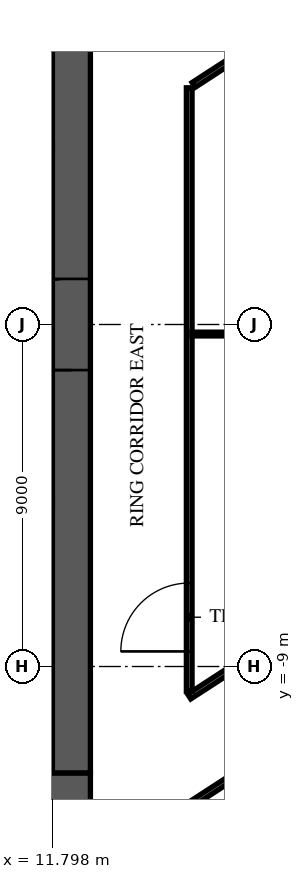
"""IFC4 building model, lengths in metres.
Left out: names, types, materials, properties, quantities, classifications, styles, units other than length and angle.
Written with IfcOpenShell. Run it as: python <this file> out.ifc"""

import sys

from ifc_helpers import new_model, si_unit, direction, frame, frame_2d, origin, place, context, subcontext, project, spatial, rectangle, extrude, element, fill, save


model = new_model("IFC4")
c1 = context("Model", 3, precision=1e-05, world=origin(), true_north=direction((0.0, 1.0)))
c2 = subcontext(c1, "Body", "Model", "MODEL_VIEW")
j1 = project(units=[si_unit("LENGTHUNIT", "METRE"), si_unit("PLANEANGLEUNIT", "RADIAN")], contexts=[c1])
p1 = place(None, origin())
s1 = spatial("IfcSite", under=j1, at=p1, CompositionType="ELEMENT")
p2 = place(p1, origin())
s2 = spatial("IfcBuilding", under=s1, at=p2, CompositionType="ELEMENT")
p3 = place(p2, frame((0.0, 0.0, 155.7)))
s3 = spatial("IfcBuildingStorey", under=s2, at=p3, CompositionType="ELEMENT", Elevation=155.7)
p4 = place(p3, frame((-12.8, -12.3, 0.0), z_axis=(0.0, 0.0, 1.0), x_axis=(1.0, 0.0, 0.0)))
e1 = element("IfcWall", 1, at=p4, inside=s3, PredefinedType="SHEAR", context=c2, shape_type="SweptSolid", body=[
    extrude(rectangle(XDim=25.6, YDim=1.0, at=frame_2d((12.8, 0.0))), origin(), (0.0, 0.0, 1.0), 3.6),
])
p5 = place(p4, frame((7.7, 0.0, 0.0)))
e2 = element("IfcOpeningElement", 2, at=p5, cuts=e1, PredefinedType="OPENING", context=c2, shape_type="SweptSolid", body=[
    extrude(rectangle(XDim=2.0, YDim=2.1, at=frame_2d((1.0, 1.05))), frame((0.0, 0.51, 0.0), z_axis=(0.0, -1.0, 0.0), x_axis=(1.0, 0.0, 0.0)), (0.0, 0.0, 1.0), 1.02),
])
p6 = place(p4, frame((17.825, 0.0, 0.0)))
e3 = element("IfcOpeningElement", 3, at=p6, cuts=e1, PredefinedType="OPENING", context=c2, shape_type="SweptSolid", body=[
    extrude(rectangle(XDim=1.2, YDim=2.1, at=frame_2d((0.6, 1.05))), frame((0.0, 0.51, 0.0), z_axis=(0.0, -1.0, 0.0), x_axis=(1.0, 0.0, 0.0)), (0.0, 0.0, 1.0), 1.02),
])
p7 = place(p4, frame((1.975, 0.0, 0.0)))
e4 = element("IfcOpeningElement", 4, at=p7, cuts=e1, PredefinedType="OPENING", context=c2, shape_type="SweptSolid", body=[
    extrude(rectangle(XDim=1.2, YDim=2.1, at=frame_2d((0.6, 1.05))), frame((0.0, 0.51, 0.0), z_axis=(0.0, -1.0, 0.0), x_axis=(1.0, 0.0, 0.0)), (0.0, 0.0, 1.0), 1.02),
])
p8 = place(p4, frame((22.425, 0.0, 0.0)))
e5 = element("IfcOpeningElement", 5, at=p8, cuts=e1, PredefinedType="OPENING", context=c2, shape_type="SweptSolid", body=[
    extrude(rectangle(XDim=1.2, YDim=2.1, at=frame_2d((0.6, 1.05))), frame((0.0, 0.51, 0.0), z_axis=(0.0, -1.0, 0.0), x_axis=(1.0, 0.0, 0.0)), (0.0, 0.0, 1.0), 1.02),
])
p9 = place(p3, frame((12.3, -11.8, 0.0), z_axis=(0.0, 0.0, 1.0), x_axis=(0.0, 1.0, 0.0)))
e6 = element("IfcWall", 6, at=p9, inside=s3, PredefinedType="SHEAR", context=c2, shape_type="SweptSolid", body=[
    extrude(rectangle(XDim=23.6, YDim=1.0, at=frame_2d((11.8, 0.0))), origin(), (0.0, 0.0, 1.0), 3.6),
])
p10 = place(p9, frame((10.6, 0.0, 0.0)))
e7 = element("IfcOpeningElement", 7, at=p10, cuts=e6, PredefinedType="OPENING", context=c2, shape_type="SweptSolid", body=[
    extrude(rectangle(XDim=2.4, YDim=2.4, at=frame_2d((1.2, 1.2))), frame((0.0, 0.51, 0.0), z_axis=(0.0, -1.0, 0.0), x_axis=(1.0, 0.0, 0.0)), (0.0, 0.0, 1.0), 1.02),
])
for number, where, z_axis, x_axis in (
    (8, (8.65, 4.675, 0.0), (0.0, 0.0, 1.0), (1.0, 0.0, 0.0)),
    (9, (8.65, -4.675, 0.0), (0.0, 0.0, 1.0), (1.0, 0.0, 0.0)),
):
    element("IfcWall", number, at=place(p3, frame(where, z_axis=z_axis, x_axis=x_axis)), inside=s3, PredefinedType="SOLIDWALL", context=c2, shape_type="SweptSolid", body=[
        extrude(rectangle(XDim=3.15, YDim=0.25, at=frame_2d((1.575, 0.0))), origin(), (0.0, 0.0, 1.0), 3.6),
    ])
p11 = place(p3, frame((-6.647, -35.438, 0.0), z_axis=(0.0, 0.0, 1.0), x_axis=(0.838672034147, 0.544636777257, 0.0)))
e10 = element("IfcWall", 10, at=p11, inside=s3, PredefinedType="STANDARD", context=c2, shape_type="SweptSolid", body=[
    extrude(rectangle(XDim=49.751, YDim=0.6, at=frame_2d((24.876, 0.0))), origin(), (0.0, 0.0, 1.0), 3.6),
])
p12 = place(p11, frame((1.161, 0.0, 0.9)))
e11 = element("IfcOpeningElement", 11, at=p12, cuts=e10, PredefinedType="OPENING", context=c2, shape_type="SweptSolid", body=[
    extrude(rectangle(XDim=2.1, YDim=2.1, at=frame_2d((1.05, 1.05))), frame((0.0, 0.31, 0.0), z_axis=(0.0, -1.0, 0.0), x_axis=(1.0, 0.0, 0.0)), (0.0, 0.0, 1.0), 0.62),
])
p13 = place(p11, frame((5.644, 0.0, 0.9)))
e12 = element("IfcOpeningElement", 12, at=p13, cuts=e10, PredefinedType="OPENING", context=c2, shape_type="SweptSolid", body=[
    extrude(rectangle(XDim=2.1, YDim=2.1, at=frame_2d((1.05, 1.05))), frame((0.0, 0.31, 0.0), z_axis=(0.0, -1.0, 0.0), x_axis=(1.0, 0.0, 0.0)), (0.0, 0.0, 1.0), 0.62),
])
p14 = place(p11, frame((10.189, 0.0, 0.9)))
e13 = element("IfcOpeningElement", 13, at=p14, cuts=e10, PredefinedType="OPENING", context=c2, shape_type="SweptSolid", body=[
    extrude(rectangle(XDim=2.1, YDim=2.1, at=frame_2d((1.05, 1.05))), frame((0.0, 0.31, 0.0), z_axis=(0.0, -1.0, 0.0), x_axis=(1.0, 0.0, 0.0)), (0.0, 0.0, 1.0), 0.62),
])
p15 = place(p11, frame((14.735, 0.0, 0.9)))
e14 = element("IfcOpeningElement", 14, at=p15, cuts=e10, PredefinedType="OPENING", context=c2, shape_type="SweptSolid", body=[
    extrude(rectangle(XDim=2.1, YDim=2.1, at=frame_2d((1.05, 1.05))), frame((0.0, 0.31, 0.0), z_axis=(0.0, -1.0, 0.0), x_axis=(1.0, 0.0, 0.0)), (0.0, 0.0, 1.0), 0.62),
])
p16 = place(p11, frame((19.28, 0.0, 0.9)))
e15 = element("IfcOpeningElement", 15, at=p16, cuts=e10, PredefinedType="OPENING", context=c2, shape_type="SweptSolid", body=[
    extrude(rectangle(XDim=2.1, YDim=2.1, at=frame_2d((1.05, 1.05))), frame((0.0, 0.31, 0.0), z_axis=(0.0, -1.0, 0.0), x_axis=(1.0, 0.0, 0.0)), (0.0, 0.0, 1.0), 0.62),
])
p17 = place(p11, frame((23.826, 0.0, 0.9)))
e16 = element("IfcOpeningElement", 16, at=p17, cuts=e10, PredefinedType="OPENING", context=c2, shape_type="SweptSolid", body=[
    extrude(rectangle(XDim=2.1, YDim=2.1, at=frame_2d((1.05, 1.05))), frame((0.0, 0.31, 0.0), z_axis=(0.0, -1.0, 0.0), x_axis=(1.0, 0.0, 0.0)), (0.0, 0.0, 1.0), 0.62),
])
p18 = place(p11, frame((28.371, 0.0, 0.9)))
e17 = element("IfcOpeningElement", 17, at=p18, cuts=e10, PredefinedType="OPENING", context=c2, shape_type="SweptSolid", body=[
    extrude(rectangle(XDim=2.1, YDim=2.1, at=frame_2d((1.05, 1.05))), frame((0.0, 0.31, 0.0), z_axis=(0.0, -1.0, 0.0), x_axis=(1.0, 0.0, 0.0)), (0.0, 0.0, 1.0), 0.62),
])
p19 = place(p11, frame((32.917, 0.0, 0.9)))
e18 = element("IfcOpeningElement", 18, at=p19, cuts=e10, PredefinedType="OPENING", context=c2, shape_type="SweptSolid", body=[
    extrude(rectangle(XDim=2.1, YDim=2.1, at=frame_2d((1.05, 1.05))), frame((0.0, 0.31, 0.0), z_axis=(0.0, -1.0, 0.0), x_axis=(1.0, 0.0, 0.0)), (0.0, 0.0, 1.0), 0.62),
])
p20 = place(p11, frame((37.462, 0.0, 0.9)))
e19 = element("IfcOpeningElement", 19, at=p20, cuts=e10, PredefinedType="OPENING", context=c2, shape_type="SweptSolid", body=[
    extrude(rectangle(XDim=2.1, YDim=2.1, at=frame_2d((1.05, 1.05))), frame((0.0, 0.31, 0.0), z_axis=(0.0, -1.0, 0.0), x_axis=(1.0, 0.0, 0.0)), (0.0, 0.0, 1.0), 0.62),
])
p21 = place(p11, frame((42.008, 0.0, 0.9)))
e20 = element("IfcOpeningElement", 20, at=p21, cuts=e10, PredefinedType="OPENING", context=c2, shape_type="SweptSolid", body=[
    extrude(rectangle(XDim=2.1, YDim=2.1, at=frame_2d((1.05, 1.05))), frame((0.0, 0.31, 0.0), z_axis=(0.0, -1.0, 0.0), x_axis=(1.0, 0.0, 0.0)), (0.0, 0.0, 1.0), 0.62),
])
p22 = place(p11, frame((46.491, 0.0, 0.9)))
e21 = element("IfcOpeningElement", 21, at=p22, cuts=e10, PredefinedType="OPENING", context=c2, shape_type="SweptSolid", body=[
    extrude(rectangle(XDim=2.1, YDim=2.1, at=frame_2d((1.05, 1.05))), frame((0.0, 0.31, 0.0), z_axis=(0.0, -1.0, 0.0), x_axis=(1.0, 0.0, 0.0)), (0.0, 0.0, 1.0), 0.62),
])
p23 = place(p3, frame((36.496, -1.667, 0.0), z_axis=(0.0, 0.0, 1.0), x_axis=(-0.544637117646, 0.838671813096, 0.0)))
e22 = element("IfcWall", 22, at=p23, inside=s3, PredefinedType="STANDARD", context=c2, shape_type="SweptSolid", body=[
    extrude(rectangle(XDim=42.176, YDim=0.6, at=frame_2d((21.088, 0.0))), origin(), (0.0, 0.0, 1.0), 3.6),
])
p24 = place(p23, frame((1.138, 0.0, 0.9)))
e23 = element("IfcOpeningElement", 23, at=p24, cuts=e22, PredefinedType="OPENING", context=c2, shape_type="SweptSolid", body=[
    extrude(rectangle(XDim=2.3, YDim=2.1, at=frame_2d((1.15, 1.05))), frame((0.0, 0.31, 0.0), z_axis=(0.0, -1.0, 0.0), x_axis=(1.0, 0.0, 0.0)), (0.0, 0.0, 1.0), 0.62),
])
p25 = place(p23, frame((5.776, 0.0, 0.9)))
e24 = element("IfcOpeningElement", 24, at=p25, cuts=e22, PredefinedType="OPENING", context=c2, shape_type="SweptSolid", body=[
    extrude(rectangle(XDim=2.3, YDim=2.1, at=frame_2d((1.15, 1.05))), frame((0.0, 0.31, 0.0), z_axis=(0.0, -1.0, 0.0), x_axis=(1.0, 0.0, 0.0)), (0.0, 0.0, 1.0), 0.62),
])
p26 = place(p23, frame((10.476, 0.0, 0.9)))
e25 = element("IfcOpeningElement", 25, at=p26, cuts=e22, PredefinedType="OPENING", context=c2, shape_type="SweptSolid", body=[
    extrude(rectangle(XDim=2.3, YDim=2.1, at=frame_2d((1.15, 1.05))), frame((0.0, 0.31, 0.0), z_axis=(0.0, -1.0, 0.0), x_axis=(1.0, 0.0, 0.0)), (0.0, 0.0, 1.0), 0.62),
])
p27 = place(p23, frame((15.176, 0.0, 0.9)))
e26 = element("IfcOpeningElement", 26, at=p27, cuts=e22, PredefinedType="OPENING", context=c2, shape_type="SweptSolid", body=[
    extrude(rectangle(XDim=2.3, YDim=2.1, at=frame_2d((1.15, 1.05))), frame((0.0, 0.31, 0.0), z_axis=(0.0, -1.0, 0.0), x_axis=(1.0, 0.0, 0.0)), (0.0, 0.0, 1.0), 0.62),
])
p28 = place(p23, frame((19.876, 0.0, 0.9)))
e27 = element("IfcOpeningElement", 27, at=p28, cuts=e22, PredefinedType="OPENING", context=c2, shape_type="SweptSolid", body=[
    extrude(rectangle(XDim=2.3, YDim=2.1, at=frame_2d((1.15, 1.05))), frame((0.0, 0.31, 0.0), z_axis=(0.0, -1.0, 0.0), x_axis=(1.0, 0.0, 0.0)), (0.0, 0.0, 1.0), 0.62),
])
p29 = place(p23, frame((24.576, 0.0, 0.9)))
e28 = element("IfcOpeningElement", 28, at=p29, cuts=e22, PredefinedType="OPENING", context=c2, shape_type="SweptSolid", body=[
    extrude(rectangle(XDim=2.3, YDim=2.1, at=frame_2d((1.15, 1.05))), frame((0.0, 0.31, 0.0), z_axis=(0.0, -1.0, 0.0), x_axis=(1.0, 0.0, 0.0)), (0.0, 0.0, 1.0), 0.62),
])
p30 = place(p23, frame((29.276, 0.0, 0.9)))
e29 = element("IfcOpeningElement", 29, at=p30, cuts=e22, PredefinedType="OPENING", context=c2, shape_type="SweptSolid", body=[
    extrude(rectangle(XDim=2.3, YDim=2.1, at=frame_2d((1.15, 1.05))), frame((0.0, 0.31, 0.0), z_axis=(0.0, -1.0, 0.0), x_axis=(1.0, 0.0, 0.0)), (0.0, 0.0, 1.0), 0.62),
])
p31 = place(p23, frame((33.976, 0.0, 0.9)))
e30 = element("IfcOpeningElement", 30, at=p31, cuts=e22, PredefinedType="OPENING", context=c2, shape_type="SweptSolid", body=[
    extrude(rectangle(XDim=2.3, YDim=2.1, at=frame_2d((1.15, 1.05))), frame((0.0, 0.31, 0.0), z_axis=(0.0, -1.0, 0.0), x_axis=(1.0, 0.0, 0.0)), (0.0, 0.0, 1.0), 0.62),
])
p32 = place(p23, frame((38.676, 0.0, 0.9)))
e31 = element("IfcOpeningElement", 31, at=p32, cuts=e22, PredefinedType="OPENING", context=c2, shape_type="SweptSolid", body=[
    extrude(rectangle(XDim=2.3, YDim=2.1, at=frame_2d((1.15, 1.05))), frame((0.0, 0.31, 0.0), z_axis=(0.0, -1.0, 0.0), x_axis=(1.0, 0.0, 0.0)), (0.0, 0.0, 1.0), 0.62),
])
p33 = place(p3, frame((-4.376, -25.496, 0.0), z_axis=(0.0, 0.0, 1.0), x_axis=(0.838659454634, 0.544656147631, 0.0)))
e32 = element("IfcWall", 32, at=p33, inside=s3, PredefinedType="PARTITIONING", context=c2, shape_type="SweptSolid", body=[
    extrude(rectangle(XDim=35.188, YDim=0.15, at=frame_2d((17.594, 0.0))), origin(), (0.0, 0.0, 1.0), 3.15),
])
p34 = place(p33, frame((2.55, 0.0, 0.0)))
e33 = element("IfcOpeningElement", 33, at=p34, cuts=e32, PredefinedType="OPENING", context=c2, shape_type="SweptSolid", body=[
    extrude(rectangle(XDim=1.0, YDim=2.1, at=frame_2d((0.5, 1.05))), frame((0.0, 0.085, 0.0), z_axis=(0.0, -1.0, 0.0), x_axis=(1.0, 0.0, 0.0)), (0.0, 0.0, 1.0), 0.17),
])
p35 = place(p33, frame((12.126, 0.0, 0.0)))
e34 = element("IfcOpeningElement", 34, at=p35, cuts=e32, PredefinedType="OPENING", context=c2, shape_type="SweptSolid", body=[
    extrude(rectangle(XDim=1.0, YDim=2.1, at=frame_2d((0.5, 1.05))), frame((0.0, 0.085, 0.0), z_axis=(0.0, -1.0, 0.0), x_axis=(1.0, 0.0, 0.0)), (0.0, 0.0, 1.0), 0.17),
])
p36 = place(p33, frame((25.759, 0.0, 0.0)))
e35 = element("IfcOpeningElement", 35, at=p36, cuts=e32, PredefinedType="OPENING", context=c2, shape_type="SweptSolid", body=[
    extrude(rectangle(XDim=1.0, YDim=2.1, at=frame_2d((0.5, 1.05))), frame((0.0, 0.085, 0.0), z_axis=(0.0, -1.0, 0.0), x_axis=(1.0, 0.0, 0.0)), (0.0, 0.0, 1.0), 0.17),
])
p37 = place(p3, frame((10.958, 22.783, 0.0), z_axis=(0.0, 0.0, 1.0), x_axis=(0.544655201926, -0.838660068809, 0.0)))
e36 = element("IfcWall", 36, at=p37, inside=s3, PredefinedType="PARTITIONING", context=c2, shape_type="SweptSolid", body=[
    extrude(rectangle(XDim=26.354, YDim=0.15, at=frame_2d((13.177, 0.0))), origin(), (0.0, 0.0, 1.0), 3.15),
])
p38 = place(p37, frame((13.46, 0.0, 0.0)))
e37 = element("IfcOpeningElement", 37, at=p38, cuts=e36, PredefinedType="OPENING", context=c2, shape_type="SweptSolid", body=[
    extrude(rectangle(XDim=1.0, YDim=2.1, at=frame_2d((0.5, 1.05))), frame((0.0, 0.085, 0.0), z_axis=(0.0, -1.0, 0.0), x_axis=(1.0, 0.0, 0.0)), (0.0, 0.0, 1.0), 0.17),
])
p39 = place(p3, frame((15.4, -9.791, 0.0), z_axis=(0.0, 0.0, 1.0), x_axis=(0.838699444503, 0.544594566435, 0.0)))
e38 = element("IfcWall", 38, at=p39, inside=s3, PredefinedType="PARTITIONING", context=c2, shape_type="SweptSolid", body=[
    extrude(rectangle(XDim=10.048, YDim=0.15, at=frame_2d((5.024, 0.0))), origin(), (0.0, 0.0, 1.0), 3.15),
])
p40 = place(p39, frame((5.8, 0.0, 0.0)))
e39 = element("IfcOpeningElement", 39, at=p40, cuts=e38, PredefinedType="OPENING", context=c2, shape_type="SweptSolid", body=[
    extrude(rectangle(XDim=1.0, YDim=2.1, at=frame_2d((0.5, 1.05))), frame((0.0, 0.085, 0.0), z_axis=(0.0, -1.0, 0.0), x_axis=(1.0, 0.0, 0.0)), (0.0, 0.0, 1.0), 0.17),
])
p41 = place(p3, frame((15.4, -9.653, 0.0), z_axis=(0.0, 0.0, 1.0), x_axis=(0.0, 1.0, 0.0)))
e40 = element("IfcWall", 40, at=p41, inside=s3, PredefinedType="PARTITIONING", context=c2, shape_type="SweptSolid", body=[
    extrude(rectangle(XDim=15.882, YDim=0.15, at=frame_2d((7.941, 0.0))), origin(), (0.0, 0.0, 1.0), 3.15),
])
p42 = place(p41, frame((1.05, 0.0, 0.0)))
e41 = element("IfcOpeningElement", 41, at=p42, cuts=e40, PredefinedType="OPENING", context=c2, shape_type="SweptSolid", body=[
    extrude(rectangle(XDim=1.8, YDim=2.1, at=frame_2d((0.9, 1.05))), frame((0.0, 0.085, 0.0), z_axis=(0.0, -1.0, 0.0), x_axis=(1.0, 0.0, 0.0)), (0.0, 0.0, 1.0), 0.17),
])
p43 = place(p3, frame((15.516, 6.304, 0.0), z_axis=(0.0, 0.0, 1.0), x_axis=(0.838528716493, 0.544857404846, 0.0)))
e42 = element("IfcWall", 42, at=p43, inside=s3, PredefinedType="PARTITIONING", context=c2, shape_type="SweptSolid", body=[
    extrude(rectangle(XDim=2.753, YDim=0.15, at=frame_2d((1.376, 0.0))), origin(), (0.0, 0.0, 1.0), 3.6),
])
p44 = place(p3, frame((15.475, -0.251, 0.0), z_axis=(0.0, 0.0, 1.0), x_axis=(1.0, 0.0, 0.0)))
e43 = element("IfcWall", 43, at=p44, inside=s3, PredefinedType="PARTITIONING", context=c2, shape_type="SweptSolid", body=[
    extrude(rectangle(XDim=7.458, YDim=0.1, at=frame_2d((3.729, 0.0))), origin(), (0.0, 0.0, 1.0), 3.6),
])
p45 = place(p10, origin())
e44 = element("IfcDoor", 44, at=p45, inside=s3, OperationType="SINGLE_SWING_LEFT", PredefinedType="DOOR", context=c2, shape_type="SweptSolid", body=[
    extrude(rectangle(XDim=2.4, YDim=2.4, at=frame_2d((1.2, 1.2))), frame((0.0, 0.025, 0.0), z_axis=(0.0, -1.0, 0.0), x_axis=(1.0, 0.0, 0.0)), (0.0, 0.0, 1.0), 0.05),
])
fill(e7, e44)
p46 = place(p42, frame((1.8, 0.0, 0.0), z_axis=(0.0, 0.0, 1.0), x_axis=(-1.0, 0.0, 0.0)))
e45 = element("IfcDoor", 45, at=p46, inside=s3, OperationType="DOUBLE_DOOR_SINGLE_SWING", PredefinedType="DOOR", context=c2, shape_type="SweptSolid", body=[
    extrude(rectangle(XDim=1.8, YDim=2.1, at=frame_2d((0.9, 1.05))), frame((0.0, 0.025, 0.0), z_axis=(0.0, -1.0, 0.0), x_axis=(1.0, 0.0, 0.0)), (0.0, 0.0, 1.0), 0.05),
])
fill(e41, e45)
save(model, sys.argv[1])
